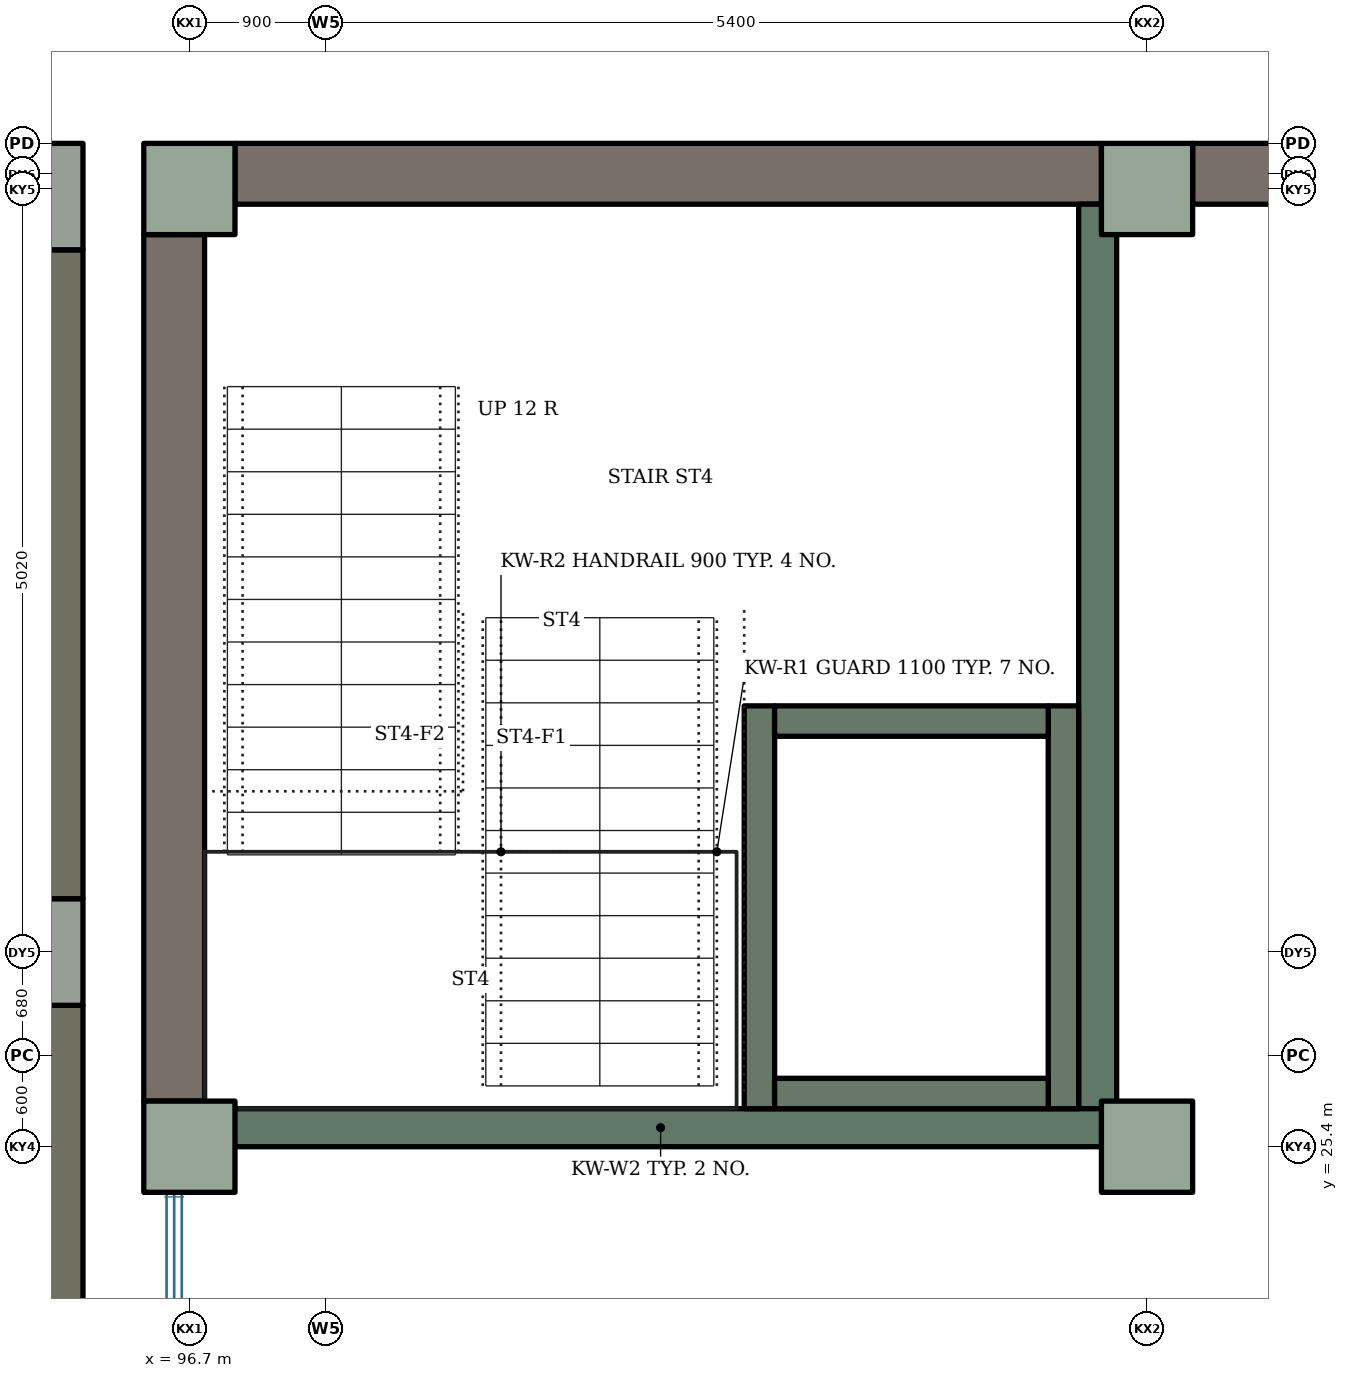
"""IFC4 building model, lengths in metres.
Left out: names, types, materials, properties, quantities, classifications, styles, units other than length and angle.
Written with IfcOpenShell. Run it as: python <this file> out.ifc"""

import sys

from ifc_helpers import new_model, si_unit, direction, frame, frame_2d, origin, origin_2d, place, context, subcontext, project, spatial, rectangle, extrude, element, fill, save


model = new_model("IFC4")
c1 = context("Model", 3, precision=1e-05, world=origin(), true_north=direction((0.0, 1.0)))
c2 = subcontext(c1, "Body", "Model", "MODEL_VIEW")
j1 = project(units=[si_unit("LENGTHUNIT", "METRE"), si_unit("PLANEANGLEUNIT", "RADIAN")], contexts=[c1])
p1 = place(None, origin())
s1 = spatial("IfcSite", under=j1, at=p1, CompositionType="ELEMENT")
p2 = place(p1, origin())
s2 = spatial("IfcBuilding", under=s1, at=p2, CompositionType="ELEMENT")
p3 = place(p2, frame((0.0, 0.0, 4.2)))
s3 = spatial("IfcBuildingStorey", under=s2, at=p3, CompositionType="ELEMENT", Elevation=4.2)
for number, where, z_axis, x_axis in (
    (1, (95.65, 31.65, 0.0), (0.0, 0.0, 1.0), (1.0, 0.0, 0.0)),
    (2, (95.65, 26.68, 0.0), (0.0, 0.0, 1.0), (1.0, 0.0, 0.0)),
):
    element("IfcColumn", number, at=place(p3, frame(where, z_axis=z_axis, x_axis=x_axis)), inside=s3, PredefinedType="COLUMN", context=c2, shape_type="SweptSolid", body=[
        extrude(rectangle(XDim=0.7, YDim=0.7, at=origin_2d()), origin(), (0.0, 0.0, 1.0), 4.2),
    ])
p4 = place(p3, frame((95.8, 21.91, 0.0), z_axis=(0.0, 0.0, 1.0), x_axis=(0.0, 1.0, 0.0)))
e3 = element("IfcWall", 3, at=p4, inside=s3, PredefinedType="SOLIDWALL", context=c2, shape_type="SweptSolid", body=[
    extrude(rectangle(XDim=4.42, YDim=0.4, at=frame_2d((2.21, 0.0))), origin(), (0.0, 0.0, 1.0), 4.2),
])
p5 = place(p4, frame((1.71, 0.0, 0.6)))
e4 = element("IfcOpeningElement", 4, at=p5, cuts=e3, PredefinedType="OPENING", context=c2, shape_type="SweptSolid", body=[
    extrude(rectangle(XDim=1.0, YDim=2.4, at=frame_2d((0.5, 1.2))), frame((0.0, 0.21, 0.0), z_axis=(0.0, -1.0, 0.0), x_axis=(1.0, 0.0, 0.0)), (0.0, 0.0, 1.0), 0.42),
])
p6 = place(p3, frame((95.8, 27.03, 0.0), z_axis=(0.0, 0.0, 1.0), x_axis=(0.0, 1.0, 0.0)))
e5 = element("IfcWall", 5, at=p6, inside=s3, PredefinedType="SOLIDWALL", context=c2, shape_type="SweptSolid", body=[
    extrude(rectangle(XDim=4.27, YDim=0.4, at=frame_2d((2.135, 0.0))), origin(), (0.0, 0.0, 1.0), 4.2),
])
p7 = place(p6, frame((1.635, 0.0, 0.6)))
e6 = element("IfcOpeningElement", 6, at=p7, cuts=e5, PredefinedType="OPENING", context=c2, shape_type="SweptSolid", body=[
    extrude(rectangle(XDim=1.0, YDim=2.4, at=frame_2d((0.5, 1.2))), frame((0.0, 0.21, 0.0), z_axis=(0.0, -1.0, 0.0), x_axis=(1.0, 0.0, 0.0)), (0.0, 0.0, 1.0), 0.42),
])
for number, where, z_axis, x_axis in (
    (7, (96.7, 25.4, 0.0), (0.0, 0.0, 1.0), (1.0, 0.0, 0.0)),
    (8, (96.7, 31.7, 0.0), (0.0, 0.0, 1.0), (1.0, 0.0, 0.0)),
    (9, (103.0, 25.4, 0.0), (0.0, 0.0, 1.0), (1.0, 0.0, 0.0)),
    (10, (103.0, 31.7, 0.0), (0.0, 0.0, 1.0), (1.0, 0.0, 0.0)),
):
    element("IfcColumn", number, at=place(p3, frame(where, z_axis=z_axis, x_axis=x_axis)), inside=s3, PredefinedType="COLUMN", context=c2, shape_type="SweptSolid", body=[
        extrude(rectangle(XDim=0.6, YDim=0.6, at=origin_2d()), origin(), (0.0, 0.0, 1.0), 4.2),
    ])
p8 = place(p3, frame((97.0, 31.8, 0.0), z_axis=(0.0, 0.0, 1.0), x_axis=(1.0, 0.0, 0.0)))
e11 = element("IfcWall", 11, at=p8, inside=s3, PredefinedType="SOLIDWALL", context=c2, shape_type="SweptSolid", body=[
    extrude(rectangle(XDim=5.7, YDim=0.4, at=frame_2d((2.85, 0.0))), origin(), (0.0, 0.0, 1.0), 4.2),
])
p9 = place(p3, frame((103.3, 31.8, 0.0), z_axis=(0.0, 0.0, 1.0), x_axis=(1.0, 0.0, 0.0)))
e12 = element("IfcWall", 12, at=p9, inside=s3, PredefinedType="SOLIDWALL", context=c2, shape_type="SweptSolid", body=[
    extrude(rectangle(XDim=5.8, YDim=0.4, at=frame_2d((2.9, 0.0))), origin(), (0.0, 0.0, 1.0), 4.2),
])
p10 = place(p9, frame((1.7, 0.0, 0.9)))
e13 = element("IfcOpeningElement", 13, at=p10, cuts=e12, PredefinedType="OPENING", context=c2, shape_type="SweptSolid", body=[
    extrude(rectangle(XDim=2.4, YDim=2.7, at=frame_2d((1.2, 1.35))), frame((0.0, 0.21, 0.0), z_axis=(0.0, -1.0, 0.0), x_axis=(1.0, 0.0, 0.0)), (0.0, 0.0, 1.0), 0.42),
])
p11 = place(p3, frame((96.6, 25.7, 0.0), z_axis=(0.0, 0.0, 1.0), x_axis=(0.0, 1.0, 0.0)))
e14 = element("IfcWall", 14, at=p11, inside=s3, PredefinedType="SOLIDWALL", context=c2, shape_type="SweptSolid", body=[
    extrude(rectangle(XDim=5.7, YDim=0.4, at=frame_2d((2.85, 0.0))), origin(), (0.0, 0.0, 1.0), 4.2),
])
p12 = place(p3, frame((102.675, 25.65, 0.0), z_axis=(0.0, 0.0, 1.0), x_axis=(0.0, 1.0, 0.0)))
e15 = element("IfcWall", 15, at=p12, inside=s3, PredefinedType="SHEAR", context=c2, shape_type="SweptSolid", body=[
    extrude(rectangle(XDim=5.95, YDim=0.25, at=frame_2d((2.975, 0.0))), origin(), (0.0, 0.0, 1.0), 4.2),
])
p13 = place(p12, frame((4.0, 0.0, 0.0)))
e16 = element("IfcOpeningElement", 16, at=p13, cuts=e15, PredefinedType="OPENING", context=c2, shape_type="SweptSolid", body=[
    extrude(rectangle(XDim=1.0, YDim=2.1, at=frame_2d((0.5, 1.05))), frame((0.0, 0.135, 0.0), z_axis=(0.0, -1.0, 0.0), x_axis=(1.0, 0.0, 0.0)), (0.0, 0.0, 1.0), 0.27),
])
p14 = place(p3, frame((96.8, 25.525, 0.0), z_axis=(0.0, 0.0, 1.0), x_axis=(1.0, 0.0, 0.0)))
e17 = element("IfcWall", 17, at=p14, inside=s3, PredefinedType="SHEAR", context=c2, shape_type="SweptSolid", body=[
    extrude(rectangle(XDim=6.0, YDim=0.25, at=frame_2d((3.0, 0.0))), origin(), (0.0, 0.0, 1.0), 4.2),
])
for number, where, z_axis, x_axis in (
    (18, (100.45, 25.65, 0.0), (0.0, 0.0, 1.0), (0.0, 1.0, 0.0)),
    (19, (102.45, 25.65, 0.0), (0.0, 0.0, 1.0), (0.0, 1.0, 0.0)),
):
    element("IfcWall", number, at=place(p3, frame(where, z_axis=z_axis, x_axis=x_axis)), inside=s3, PredefinedType="SHEAR", context=c2, shape_type="SweptSolid", body=[
        extrude(rectangle(XDim=2.65, YDim=0.2, at=frame_2d((1.325, 0.0))), origin(), (0.0, 0.0, 1.0), 4.2),
    ])
p15 = place(p3, frame((100.55, 25.75, 0.0), z_axis=(0.0, 0.0, 1.0), x_axis=(1.0, 0.0, 0.0)))
e20 = element("IfcWall", 20, at=p15, inside=s3, PredefinedType="SHEAR", context=c2, shape_type="SweptSolid", body=[
    extrude(rectangle(XDim=1.8, YDim=0.2, at=frame_2d((0.9, 0.0))), origin(), (0.0, 0.0, 1.0), 4.2),
])
p16 = place(p3, frame((100.55, 28.2, 0.0), z_axis=(0.0, 0.0, 1.0), x_axis=(1.0, 0.0, 0.0)))
e21 = element("IfcWall", 21, at=p16, inside=s3, PredefinedType="SHEAR", context=c2, shape_type="SweptSolid", body=[
    extrude(rectangle(XDim=1.8, YDim=0.2, at=frame_2d((0.9, 0.0))), origin(), (0.0, 0.0, 1.0), 4.2),
])
p17 = place(p16, frame((0.35, 0.0, 0.0)))
e22 = element("IfcOpeningElement", 22, at=p17, cuts=e21, PredefinedType="OPENING", context=c2, shape_type="SweptSolid", body=[
    extrude(rectangle(XDim=1.1, YDim=2.1, at=frame_2d((0.55, 1.05))), frame((0.0, 0.11, 0.0), z_axis=(0.0, -1.0, 0.0), x_axis=(1.0, 0.0, 0.0)), (0.0, 0.0, 1.0), 0.22),
])
p18 = place(p3, frame((103.22, 31.6, 0.0), z_axis=(0.0, 0.0, 1.0), x_axis=(-1.0, 0.0, 0.0)))
e23 = element("IfcWall", 23, at=p18, inside=s3, PredefinedType="PARTITIONING", context=c2, shape_type="SweptSolid", body=[
    extrude(rectangle(XDim=0.34, YDim=0.15, at=frame_2d((0.17, 0.0))), origin(), (0.0, 0.0, 1.0), 3.92),
])
p19 = place(p5, origin())
e24 = element("IfcWindow", 24, at=p19, inside=s3, PartitioningType="SINGLE_PANEL", PredefinedType="WINDOW", context=c2, shape_type="SweptSolid", body=[
    extrude(rectangle(XDim=1.0, YDim=2.4, at=frame_2d((0.5, 1.2))), frame((0.0, 0.03, 0.0), z_axis=(0.0, -1.0, 0.0), x_axis=(1.0, 0.0, 0.0)), (0.0, 0.0, 1.0), 0.06),
])
fill(e4, e24)
p20 = place(p7, origin())
e25 = element("IfcWindow", 25, at=p20, inside=s3, PartitioningType="SINGLE_PANEL", PredefinedType="WINDOW", context=c2, shape_type="SweptSolid", body=[
    extrude(rectangle(XDim=1.0, YDim=2.4, at=frame_2d((0.5, 1.2))), frame((0.0, 0.03, 0.0), z_axis=(0.0, -1.0, 0.0), x_axis=(1.0, 0.0, 0.0)), (0.0, 0.0, 1.0), 0.06),
])
fill(e6, e25)
p21 = place(p17, origin())
e26 = element("IfcDoor", 26, at=p21, inside=s3, OperationType="SLIDING_TO_LEFT", PredefinedType="DOOR", context=c2, shape_type="SweptSolid", body=[
    extrude(rectangle(XDim=1.1, YDim=2.1, at=frame_2d((0.55, 1.05))), frame((0.0, 0.025, 0.0), z_axis=(0.0, -1.0, 0.0), x_axis=(1.0, 0.0, 0.0)), (0.0, 0.0, 1.0), 0.05),
])
fill(e22, e26)
p22 = place(p13, origin())
e27 = element("IfcDoor", 27, at=p22, inside=s3, OperationType="SINGLE_SWING_LEFT", PredefinedType="DOOR", context=c2, shape_type="SweptSolid", body=[
    extrude(rectangle(XDim=1.0, YDim=2.1, at=frame_2d((0.5, 1.05))), frame((0.0, 0.025, 0.0), z_axis=(0.0, -1.0, 0.0), x_axis=(1.0, 0.0, 0.0)), (0.0, 0.0, 1.0), 0.05),
])
fill(e16, e27)
save(model, sys.argv[1])
